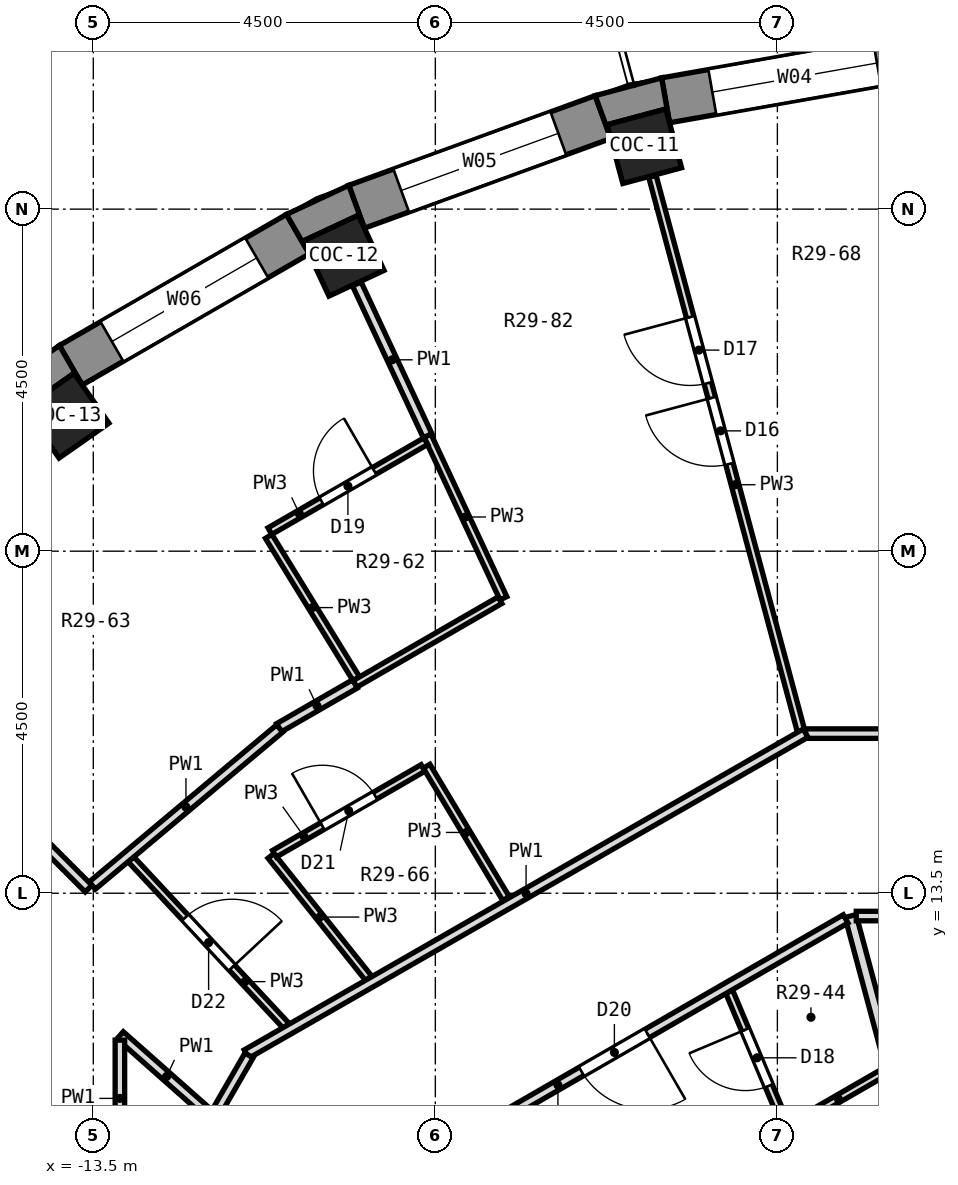
"""IFC4 building model, lengths in metres.
Left out: names, types, materials, properties, quantities, classifications, styles, units other than length and angle.
Written with IfcOpenShell. Run it as: python <this file> out.ifc"""

import sys

from ifc_helpers import new_model, si_unit, direction, frame, frame_2d, origin, origin_2d, place, context, subcontext, project, spatial, polyline, rectangle, outline, extrude, element, fill, save


model = new_model("IFC4")
c1 = context("Model", 3, precision=1e-05, world=origin(), true_north=direction((0.0, 1.0)))
c2 = subcontext(c1, "Body", "Model", "MODEL_VIEW")
j1 = project(units=[si_unit("LENGTHUNIT", "METRE"), si_unit("PLANEANGLEUNIT", "RADIAN")], contexts=[c1])
p1 = place(None, origin())
s1 = spatial("IfcSite", under=j1, at=p1, CompositionType="ELEMENT")
p2 = place(p1, origin())
s2 = spatial("IfcBuilding", under=s1, at=p2, CompositionType="ELEMENT")
p3 = place(p2, frame((0.0, 0.0, 200.4)))
s3 = spatial("IfcBuildingStorey", under=s2, at=p3, CompositionType="ELEMENT", Elevation=200.4)
for number, where, z_axis, x_axis in (
    (1, (-6.25, 23.327, 0.0), (0.0, 0.0, 1.0), (-0.259, 0.966, 0.0)),
    (2, (-10.206, 21.887, 0.0), (0.0, 0.0, 1.0), (-0.423, 0.906, 0.0)),
    (3, (-13.852, 19.782, 0.0), (0.0, 0.0, 1.0), (-0.574, 0.819, 0.0)),
):
    element("IfcColumn", number, at=place(p3, frame(where, z_axis=z_axis, x_axis=x_axis)), inside=s3, PredefinedType="COLUMN", context=c2, shape_type="SweptSolid", body=[
        extrude(rectangle(XDim=0.8, YDim=0.8, at=origin_2d()), origin(), (0.0, 0.0, 1.0), 3.3),
    ])
p4 = place(p3, frame((-2.574, 24.531, 0.0), z_axis=(0.0, 0.0, 1.0), x_axis=(-0.984814892183, -0.173607684551, 0.0)))
e4 = element("IfcWall", 4, at=p4, inside=s3, PredefinedType="SOLIDWALL", context=c2, shape_type="SweptSolid", body=[
    extrude(rectangle(XDim=3.45, YDim=0.6, at=frame_2d((1.725, 0.0))), origin(), (0.0, 0.0, 1.0), 2.85),
])
p5 = place(p4, frame((0.625, 0.0, 0.9)))
e5 = element("IfcOpeningElement", 5, at=p5, cuts=e4, PredefinedType="OPENING", context=c2, shape_type="SweptSolid", body=[
    extrude(rectangle(XDim=2.2, YDim=1.8, at=frame_2d((1.1, 0.9))), frame((0.0, 0.312, 0.0), z_axis=(0.0, -1.0, 0.0), x_axis=(1.0, 0.0, 0.0)), (0.0, 0.0, 1.0), 0.624),
])
p6 = place(p3, frame((-6.794, 23.711, 0.0), z_axis=(0.0, 0.0, 1.0), x_axis=(-0.93968799822, -0.342032843455, 0.0)))
e6 = element("IfcWall", 6, at=p6, inside=s3, PredefinedType="SOLIDWALL", context=c2, shape_type="SweptSolid", body=[
    extrude(rectangle(XDim=3.45, YDim=0.6, at=frame_2d((1.725, 0.0))), origin(), (0.0, 0.0, 1.0), 2.85),
])
p7 = place(p6, frame((0.625, 0.0, 0.9)))
e7 = element("IfcOpeningElement", 7, at=p7, cuts=e6, PredefinedType="OPENING", context=c2, shape_type="SweptSolid", body=[
    extrude(rectangle(XDim=2.2, YDim=1.8, at=frame_2d((1.1, 0.9))), frame((0.0, 0.312, 0.0), z_axis=(0.0, -1.0, 0.0), x_axis=(1.0, 0.0, 0.0)), (0.0, 0.0, 1.0), 0.624),
])
p8 = place(p3, frame((-10.809, 22.171, 0.0), z_axis=(0.0, 0.0, 1.0), x_axis=(-0.86602648383, -0.499998129301, 0.0)))
e8 = element("IfcWall", 8, at=p8, inside=s3, PredefinedType="SOLIDWALL", context=c2, shape_type="SweptSolid", body=[
    extrude(rectangle(XDim=3.45, YDim=0.6, at=frame_2d((1.725, 0.0))), origin(), (0.0, 0.0, 1.0), 2.85),
])
p9 = place(p8, frame((0.625, 0.0, 0.9)))
e9 = element("IfcOpeningElement", 9, at=p9, cuts=e8, PredefinedType="OPENING", context=c2, shape_type="SweptSolid", body=[
    extrude(rectangle(XDim=2.2, YDim=1.8, at=frame_2d((1.1, 0.9))), frame((0.0, 0.312, 0.0), z_axis=(0.0, -1.0, 0.0), x_axis=(1.0, 0.0, 0.0)), (0.0, 0.0, 1.0), 0.624),
])
p10 = place(p3, origin())
e10 = element("IfcWall", 10, at=p10, inside=s3, PredefinedType="SOLIDWALL", context=c2, shape_type="SweptSolid", body=[
    extrude(outline(polyline([(-6.023, 24.227), (-6.897, 23.993), (-6.692, 23.429), (-6.74, 23.61), (-5.968, 23.817), (-5.919, 23.636), (-6.023, 24.227)])), origin(), (0.0, 0.0, 1.0), 2.85),
])
p11 = place(p3, origin())
e11 = element("IfcWall", 11, at=p11, inside=s3, PredefinedType="SOLIDWALL", context=c2, shape_type="SweptSolid", body=[
    extrude(outline(polyline([(-10.959, 22.431), (-10.659, 21.911), (-10.738, 22.081), (-10.013, 22.419), (-9.934, 22.249), (-10.139, 22.813), (-10.959, 22.431)])), origin(), (0.0, 0.0, 1.0), 2.85),
])
p12 = place(p3, origin())
e12 = element("IfcWall", 12, at=p12, inside=s3, PredefinedType="SOLIDWALL", context=c2, shape_type="SweptSolid", body=[
    extrude(outline(polyline([(-13.946, 20.706), (-14.687, 20.187), (-14.302, 19.727), (-14.409, 19.881), (-13.754, 20.34), (-13.646, 20.186), (-13.946, 20.706)])), origin(), (0.0, 0.0, 1.0), 2.85),
])
p13 = place(p3, frame((-6.144, 22.931, 0.0), z_axis=(0.0, 0.0, 1.0), x_axis=(0.258789681819, -0.965933693679, 0.0)))
e13 = element("IfcWall", 13, at=p13, inside=s3, PredefinedType="PARTITIONING", context=c2, shape_type="SweptSolid", body=[
    extrude(rectangle(XDim=7.59, YDim=0.1, at=frame_2d((3.795, 0.0))), origin(), (0.0, 0.0, 1.0), 2.85),
])
p14 = place(p13, frame((3.016, 0.0, 0.0)))
e14 = element("IfcOpeningElement", 14, at=p14, cuts=e13, PredefinedType="OPENING", context=c2, shape_type="SweptSolid", body=[
    extrude(rectangle(XDim=0.9, YDim=2.1, at=frame_2d((0.45, 1.05))), frame((0.0, 0.062, 0.0), z_axis=(0.0, -1.0, 0.0), x_axis=(1.0, 0.0, 0.0)), (0.0, 0.0, 1.0), 0.124),
])
p15 = place(p13, frame((1.916, 0.0, 0.0)))
e15 = element("IfcOpeningElement", 15, at=p15, cuts=e13, PredefinedType="OPENING", context=c2, shape_type="SweptSolid", body=[
    extrude(rectangle(XDim=0.9, YDim=2.1, at=frame_2d((0.45, 1.05))), frame((0.0, 0.062, 0.0), z_axis=(0.0, -1.0, 0.0), x_axis=(1.0, 0.0, 0.0)), (0.0, 0.0, 1.0), 0.124),
])
p16 = place(p3, frame((-3.537, 13.2, 0.0), z_axis=(0.0, 0.0, 1.0), x_axis=(0.258907621224, -0.965902088036, 0.0)))
e16 = element("IfcWall", 16, at=p16, inside=s3, PredefinedType="PARTITIONING", context=c2, shape_type="SweptSolid", body=[
    extrude(rectangle(XDim=4.174, YDim=0.15, at=frame_2d((2.087, 0.0))), origin(), (0.0, 0.0, 1.0), 2.85),
])
p17 = place(p3, frame((-5.135, 12.206, 0.0), z_axis=(0.0, 0.0, 1.0), x_axis=(0.387906100406, -0.921698897291, 0.0)))
e17 = element("IfcWall", 17, at=p17, inside=s3, PredefinedType="PARTITIONING", context=c2, shape_type="SweptSolid", body=[
    extrude(rectangle(XDim=1.953, YDim=0.1, at=frame_2d((0.977, 0.0))), origin(), (0.0, 0.0, 1.0), 2.85),
])
p18 = place(p17, frame((0.545, 0.0, 0.0)))
e18 = element("IfcOpeningElement", 18, at=p18, cuts=e17, PredefinedType="OPENING", context=c2, shape_type="SweptSolid", body=[
    extrude(rectangle(XDim=0.8, YDim=2.1, at=frame_2d((0.4, 1.05))), frame((0.0, 0.062, 0.0), z_axis=(0.0, -1.0, 0.0), x_axis=(1.0, 0.0, 0.0)), (0.0, 0.0, 1.0), 0.124),
])
p19 = place(p3, frame((-9.103, 19.519, 0.0), z_axis=(0.0, 0.0, 1.0), x_axis=(0.422834478158, -0.906206932263, 0.0)))
e19 = element("IfcWall", 19, at=p19, inside=s3, PredefinedType="PARTITIONING", context=c2, shape_type="SweptSolid", body=[
    extrude(rectangle(XDim=2.359, YDim=0.1, at=frame_2d((1.18, 0.0))), origin(), (0.0, 0.0, 1.0), 2.85),
])
p20 = place(p3, frame((-10.033, 21.516, 0.0), z_axis=(0.0, 0.0, 1.0), x_axis=(0.422709503006, -0.906265234944, 0.0)))
e20 = element("IfcWall", 20, at=p20, inside=s3, PredefinedType="PARTITIONING", context=c2, shape_type="SweptSolid", body=[
    extrude(rectangle(XDim=2.203, YDim=0.125, at=frame_2d((1.102, 0.0))), origin(), (0.0, 0.0, 1.0), 2.85),
])
p21 = place(p3, frame((-9.115, 15.171, 0.0), z_axis=(0.0, 0.0, 1.0), x_axis=(0.514495755428, -0.857492925713, 0.0)))
e21 = element("IfcWall", 21, at=p21, inside=s3, PredefinedType="PARTITIONING", context=c2, shape_type="SweptSolid", body=[
    extrude(rectangle(XDim=2.031, YDim=0.1, at=frame_2d((1.016, 0.0))), origin(), (0.0, 0.0, 1.0), 2.85),
])
p22 = place(p3, frame((-11.193, 18.195, 0.0), z_axis=(0.0, 0.0, 1.0), x_axis=(0.524029299745, -0.851700236591, 0.0)))
e22 = element("IfcWall", 22, at=p22, inside=s3, PredefinedType="PARTITIONING", context=c2, shape_type="SweptSolid", body=[
    extrude(rectangle(XDim=2.199, YDim=0.1, at=frame_2d((1.1, 0.0))), origin(), (0.0, 0.0, 1.0), 2.85),
])
p23 = place(p3, frame((-11.162, 13.992, 0.0), z_axis=(0.0, 0.0, 1.0), x_axis=(0.62359563311, -0.781747073142, 0.0)))
e23 = element("IfcWall", 23, at=p23, inside=s3, PredefinedType="PARTITIONING", context=c2, shape_type="SweptSolid", body=[
    extrude(rectangle(XDim=2.059, YDim=0.1, at=frame_2d((1.03, 0.0))), origin(), (0.0, 0.0, 1.0), 2.85),
])
p24 = place(p3, frame((-13.004, 13.946, 0.0), z_axis=(0.0, 0.0, 1.0), x_axis=(0.681856446627, -0.731486012302, 0.0)))
e24 = element("IfcWall", 24, at=p24, inside=s3, PredefinedType="PARTITIONING", context=c2, shape_type="SweptSolid", body=[
    extrude(rectangle(XDim=2.996, YDim=0.1, at=frame_2d((1.498, 0.0))), origin(), (0.0, 0.0, 1.0), 2.85),
])
p25 = place(p24, frame((1.048, 0.0, 0.0)))
e25 = element("IfcOpeningElement", 25, at=p25, cuts=e24, PredefinedType="OPENING", context=c2, shape_type="SweptSolid", body=[
    extrude(rectangle(XDim=0.9, YDim=2.1, at=frame_2d((0.45, 1.05))), frame((0.0, 0.062, 0.0), z_axis=(0.0, -1.0, 0.0), x_axis=(1.0, 0.0, 0.0)), (0.0, 0.0, 1.0), 0.124),
])
p26 = place(p3, frame((-16.787, 16.787, 0.0), z_axis=(0.0, 0.0, 1.0), x_axis=(0.707026475293, -0.707187077961, 0.0)))
e26 = element("IfcWall", 26, at=p26, inside=s3, PredefinedType="PARTITIONING", context=c2, shape_type="SweptSolid", body=[
    extrude(rectangle(XDim=4.561, YDim=0.125, at=frame_2d((2.28, 0.0))), origin(), (0.0, 0.0, 1.0), 2.85),
])
p27 = place(p26, frame((1.502, 0.0, 0.0)))
e27 = element("IfcOpeningElement", 27, at=p27, cuts=e26, PredefinedType="OPENING", context=c2, shape_type="SweptSolid", body=[
    extrude(rectangle(XDim=0.9, YDim=2.1, at=frame_2d((0.45, 1.05))), frame((0.0, 0.074, 0.0), z_axis=(0.0, -1.0, 0.0), x_axis=(1.0, 0.0, 0.0)), (0.0, 0.0, 1.0), 0.149),
])
p28 = place(p3, frame((-13.147, 11.631, 0.0), z_axis=(0.0, 0.0, 1.0), x_axis=(0.748973743587, -0.66259967659, 0.0)))
e28 = element("IfcWall", 28, at=p28, inside=s3, PredefinedType="PARTITIONING", context=c2, shape_type="SweptSolid", body=[
    extrude(rectangle(XDim=1.634, YDim=0.125, at=frame_2d((0.817, 0.0))), origin(), (0.0, 0.0, 1.0), 2.85),
])
p29 = place(p3, frame((-3.462, 13.2, 0.0), z_axis=(0.0, 0.0, 1.0), x_axis=(1.0, 0.0, 0.0)))
e29 = element("IfcWall", 29, at=p29, inside=s3, PredefinedType="PARTITIONING", context=c2, shape_type="SweptSolid", body=[
    extrude(rectangle(XDim=6.937, YDim=0.125, at=frame_2d((3.468, 0.0))), origin(), (0.0, 0.0, 1.0), 2.85),
])
p30 = place(p29, frame((5.614, 0.0, 0.0)))
e30 = element("IfcOpeningElement", 30, at=p30, cuts=e29, PredefinedType="OPENING", context=c2, shape_type="SweptSolid", body=[
    extrude(rectangle(XDim=1.0, YDim=2.1, at=frame_2d((0.5, 1.05))), frame((0.0, 0.074, 0.0), z_axis=(0.0, -1.0, 0.0), x_axis=(1.0, 0.0, 0.0)), (0.0, 0.0, 1.0), 0.149),
])
p31 = place(p29, frame((3.013, 0.0, 0.0)))
e31 = element("IfcOpeningElement", 31, at=p31, cuts=e29, PredefinedType="OPENING", context=c2, shape_type="SweptSolid", body=[
    extrude(rectangle(XDim=1.0, YDim=2.1, at=frame_2d((0.5, 1.05))), frame((0.0, 0.074, 0.0), z_axis=(0.0, -1.0, 0.0), x_axis=(1.0, 0.0, 0.0)), (0.0, 0.0, 1.0), 0.149),
])
p32 = place(p3, frame((-4.129, 15.6, 0.0), z_axis=(0.0, 0.0, 1.0), x_axis=(1.0, 0.0, 0.0)))
e32 = element("IfcWall", 32, at=p32, inside=s3, PredefinedType="PARTITIONING", context=c2, shape_type="SweptSolid", body=[
    extrude(rectangle(XDim=8.246, YDim=0.125, at=frame_2d((4.123, 0.0))), origin(), (0.0, 0.0, 1.0), 2.85),
])
p33 = place(p32, frame((6.26, 0.0, 0.0)))
e33 = element("IfcOpeningElement", 33, at=p33, cuts=e32, PredefinedType="OPENING", context=c2, shape_type="SweptSolid", body=[
    extrude(rectangle(XDim=1.0, YDim=2.1, at=frame_2d((0.5, 1.05))), frame((0.0, 0.074, 0.0), z_axis=(0.0, -1.0, 0.0), x_axis=(1.0, 0.0, 0.0)), (0.0, 0.0, 1.0), 0.149),
])
p34 = place(p32, frame((2.221, 0.0, 0.0)))
e34 = element("IfcOpeningElement", 34, at=p34, cuts=e32, PredefinedType="OPENING", context=c2, shape_type="SweptSolid", body=[
    extrude(rectangle(XDim=1.0, YDim=2.1, at=frame_2d((0.5, 1.05))), frame((0.0, 0.074, 0.0), z_axis=(0.0, -1.0, 0.0), x_axis=(1.0, 0.0, 0.0)), (0.0, 0.0, 1.0), 0.149),
])
p35 = place(p3, frame((-11.484, 11.385, 0.0), z_axis=(0.0, 0.0, 1.0), x_axis=(0.867290156456, 0.497802957519, 0.0)))
e35 = element("IfcWall", 35, at=p35, inside=s3, PredefinedType="PARTITIONING", context=c2, shape_type="SweptSolid", body=[
    extrude(rectangle(XDim=8.48, YDim=0.125, at=frame_2d((4.24, 0.0))), origin(), (0.0, 0.0, 1.0), 2.85),
])
p36 = place(p3, frame((-4.334, 10.431, 0.0), z_axis=(0.0, 0.0, 1.0), x_axis=(0.866110606688, 0.499852395195, 0.0)))
e36 = element("IfcWall", 36, at=p36, inside=s3, PredefinedType="PARTITIONING", context=c2, shape_type="SweptSolid", body=[
    extrude(rectangle(XDim=1.464, YDim=0.1, at=frame_2d((0.732, 0.0))), origin(), (0.0, 0.0, 1.0), 2.85),
])
p37 = place(p3, frame((-9.726, 9.627, 0.0), z_axis=(0.0, 0.0, 1.0), x_axis=(0.866011939619, 0.500023319893, 0.0)))
e37 = element("IfcWall", 37, at=p37, inside=s3, PredefinedType="PARTITIONING", context=c2, shape_type="SweptSolid", body=[
    extrude(rectangle(XDim=7.071, YDim=0.125, at=frame_2d((3.536, 0.0))), origin(), (0.0, 0.0, 1.0), 2.85),
])
p38 = place(p37, frame((3.058, 0.0, 0.0)))
e38 = element("IfcOpeningElement", 38, at=p38, cuts=e37, PredefinedType="OPENING", context=c2, shape_type="SweptSolid", body=[
    extrude(rectangle(XDim=1.0, YDim=2.1, at=frame_2d((0.5, 1.05))), frame((0.0, 0.074, 0.0), z_axis=(0.0, -1.0, 0.0), x_axis=(1.0, 0.0, 0.0)), (0.0, 0.0, 1.0), 0.149),
])
p39 = place(p3, frame((-11.117, 14.02, 0.0), z_axis=(0.0, 0.0, 1.0), x_axis=(0.866084712978, 0.49989725939, 0.0)))
e39 = element("IfcWall", 39, at=p39, inside=s3, PredefinedType="PARTITIONING", context=c2, shape_type="SweptSolid", body=[
    extrude(rectangle(XDim=2.257, YDim=0.1, at=frame_2d((1.128, 0.0))), origin(), (0.0, 0.0, 1.0), 2.85),
])
p40 = place(p39, frame((0.729, 0.0, 0.0)))
e40 = element("IfcOpeningElement", 40, at=p40, cuts=e39, PredefinedType="OPENING", context=c2, shape_type="SweptSolid", body=[
    extrude(rectangle(XDim=0.8, YDim=2.1, at=frame_2d((0.4, 1.05))), frame((0.0, 0.062, 0.0), z_axis=(0.0, -1.0, 0.0), x_axis=(1.0, 0.0, 0.0)), (0.0, 0.0, 1.0), 0.124),
])
p41 = place(p3, frame((-10.058, 16.253, 0.0), z_axis=(0.0, 0.0, 1.0), x_axis=(0.866039875853, 0.499974932805, 0.0)))
e41 = element("IfcWall", 41, at=p41, inside=s3, PredefinedType="PARTITIONING", context=c2, shape_type="SweptSolid", body=[
    extrude(rectangle(XDim=2.204, YDim=0.1, at=frame_2d((1.102, 0.0))), origin(), (0.0, 0.0, 1.0), 2.85),
])
p42 = place(p3, frame((-11.057, 15.677, 0.0), z_axis=(0.0, 0.0, 1.0), x_axis=(0.866308888763, 0.499508667843, 0.0)))
e42 = element("IfcWall", 42, at=p42, inside=s3, PredefinedType="PARTITIONING", context=c2, shape_type="SweptSolid", body=[
    extrude(rectangle(XDim=1.154, YDim=0.125, at=frame_2d((0.577, 0.0))), origin(), (0.0, 0.0, 1.0), 2.85),
])
p43 = place(p3, frame((-11.177, 18.264, 0.0), z_axis=(0.0, 0.0, 1.0), x_axis=(0.866180437728, 0.49973137714, 0.0)))
e43 = element("IfcWall", 43, at=p43, inside=s3, PredefinedType="PARTITIONING", context=c2, shape_type="SweptSolid", body=[
    extrude(rectangle(XDim=2.368, YDim=0.1, at=frame_2d((1.184, 0.0))), origin(), (0.0, 0.0, 1.0), 2.85),
])
p44 = place(p43, frame((0.785, 0.0, 0.0)))
e44 = element("IfcOpeningElement", 44, at=p44, cuts=e43, PredefinedType="OPENING", context=c2, shape_type="SweptSolid", body=[
    extrude(rectangle(XDim=0.8, YDim=2.1, at=frame_2d((0.4, 1.05))), frame((0.0, 0.062, 0.0), z_axis=(0.0, -1.0, 0.0), x_axis=(1.0, 0.0, 0.0)), (0.0, 0.0, 1.0), 0.124),
])
p45 = place(p3, frame((-13.513, 13.601, 0.0), z_axis=(0.0, 0.0, 1.0), x_axis=(0.766376010837, 0.642392255567, 0.0)))
e45 = element("IfcWall", 45, at=p45, inside=s3, PredefinedType="PARTITIONING", context=c2, shape_type="SweptSolid", body=[
    extrude(rectangle(XDim=3.216, YDim=0.125, at=frame_2d((1.608, 0.0))), origin(), (0.0, 0.0, 1.0), 2.85),
])
p46 = place(p3, frame((-11.891, 10.604, 0.0), z_axis=(0.0, 0.0, 1.0), x_axis=(0.500018690203, 0.866014612722, 0.0)))
e46 = element("IfcWall", 46, at=p46, inside=s3, PredefinedType="PARTITIONING", context=c2, shape_type="SweptSolid", body=[
    extrude(rectangle(XDim=0.88, YDim=0.125, at=frame_2d((0.44, 0.0))), origin(), (0.0, 0.0, 1.0), 2.85),
])
p47 = place(p3, frame((-13.15, 9.351, 0.0), z_axis=(0.0, 0.0, 1.0), x_axis=(0.0, 1.0, 0.0)))
e47 = element("IfcWall", 47, at=p47, inside=s3, PredefinedType="PARTITIONING", context=c2, shape_type="SweptSolid", body=[
    extrude(rectangle(XDim=2.216, YDim=0.125, at=frame_2d((1.108, 0.0))), origin(), (0.0, 0.0, 1.0), 2.85),
])
p48 = place(p47, frame((0.189, 0.0, 0.0)))
e48 = element("IfcOpeningElement", 48, at=p48, cuts=e47, PredefinedType="OPENING", context=c2, shape_type="SweptSolid", body=[
    extrude(rectangle(XDim=0.9, YDim=2.1, at=frame_2d((0.45, 1.05))), frame((0.0, 0.074, 0.0), z_axis=(0.0, -1.0, 0.0), x_axis=(1.0, 0.0, 0.0)), (0.0, 0.0, 1.0), 0.149),
])
p49 = place(p5, origin())
e49 = element("IfcWindow", 49, at=p49, inside=s3, PartitioningType="SINGLE_PANEL", PredefinedType="WINDOW", context=c2, shape_type="SweptSolid", body=[
    extrude(rectangle(XDim=2.2, YDim=1.8, at=frame_2d((1.1, 0.9))), frame((0.0, 0.18, 0.0), z_axis=(0.0, -1.0, 0.0), x_axis=(1.0, 0.0, 0.0)), (0.0, 0.0, 1.0), 0.06),
])
fill(e5, e49)
p50 = place(p7, origin())
e50 = element("IfcWindow", 50, at=p50, inside=s3, PartitioningType="SINGLE_PANEL", PredefinedType="WINDOW", context=c2, shape_type="SweptSolid", body=[
    extrude(rectangle(XDim=2.2, YDim=1.8, at=frame_2d((1.1, 0.9))), frame((0.0, 0.18, 0.0), z_axis=(0.0, -1.0, 0.0), x_axis=(1.0, 0.0, 0.0)), (0.0, 0.0, 1.0), 0.06),
])
fill(e7, e50)
p51 = place(p9, origin())
e51 = element("IfcWindow", 51, at=p51, inside=s3, PartitioningType="SINGLE_PANEL", PredefinedType="WINDOW", context=c2, shape_type="SweptSolid", body=[
    extrude(rectangle(XDim=2.2, YDim=1.8, at=frame_2d((1.1, 0.9))), frame((0.0, 0.18, 0.0), z_axis=(0.0, -1.0, 0.0), x_axis=(1.0, 0.0, 0.0)), (0.0, 0.0, 1.0), 0.06),
])
fill(e9, e51)
p52 = place(p14, frame((0.9, 0.0, 0.0), z_axis=(0.0, 0.0, 1.0), x_axis=(-1.0, 0.0, 0.0)))
e52 = element("IfcDoor", 52, at=p52, inside=s3, OperationType="SINGLE_SWING_RIGHT", PredefinedType="DOOR", context=c2, shape_type="SweptSolid", body=[
    extrude(rectangle(XDim=0.9, YDim=2.1, at=frame_2d((0.45, 1.05))), frame((0.0, 0.025, 0.0), z_axis=(0.0, -1.0, 0.0), x_axis=(1.0, 0.0, 0.0)), (0.0, 0.0, 1.0), 0.05),
])
fill(e14, e52)
p53 = place(p15, frame((0.9, 0.0, 0.0), z_axis=(0.0, 0.0, 1.0), x_axis=(-1.0, 0.0, 0.0)))
e53 = element("IfcDoor", 53, at=p53, inside=s3, OperationType="SINGLE_SWING_RIGHT", PredefinedType="DOOR", context=c2, shape_type="SweptSolid", body=[
    extrude(rectangle(XDim=0.9, YDim=2.1, at=frame_2d((0.45, 1.05))), frame((0.0, 0.025, 0.0), z_axis=(0.0, -1.0, 0.0), x_axis=(1.0, 0.0, 0.0)), (0.0, 0.0, 1.0), 0.05),
])
fill(e15, e53)
p54 = place(p18, frame((0.8, 0.0, 0.0), z_axis=(0.0, 0.0, 1.0), x_axis=(-1.0, 0.0, 0.0)))
e54 = element("IfcDoor", 54, at=p54, inside=s3, OperationType="SINGLE_SWING_RIGHT", PredefinedType="DOOR", context=c2, shape_type="SweptSolid", body=[
    extrude(rectangle(XDim=0.8, YDim=2.1, at=frame_2d((0.4, 1.05))), frame((0.0, 0.025, 0.0), z_axis=(0.0, -1.0, 0.0), x_axis=(1.0, 0.0, 0.0)), (0.0, 0.0, 1.0), 0.05),
])
fill(e18, e54)
p55 = place(p44, origin())
e55 = element("IfcDoor", 55, at=p55, inside=s3, OperationType="SINGLE_SWING_RIGHT", PredefinedType="DOOR", context=c2, shape_type="SweptSolid", body=[
    extrude(rectangle(XDim=0.8, YDim=2.1, at=frame_2d((0.4, 1.05))), frame((0.0, 0.025, 0.0), z_axis=(0.0, -1.0, 0.0), x_axis=(1.0, 0.0, 0.0)), (0.0, 0.0, 1.0), 0.05),
])
fill(e44, e55)
p56 = place(p38, frame((1.0, 0.0, 0.0), z_axis=(0.0, 0.0, 1.0), x_axis=(-1.0, 0.0, 0.0)))
e56 = element("IfcDoor", 56, at=p56, inside=s3, OperationType="SINGLE_SWING_LEFT", PredefinedType="DOOR", context=c2, shape_type="SweptSolid", body=[
    extrude(rectangle(XDim=1.0, YDim=2.1, at=frame_2d((0.5, 1.05))), frame((0.0, 0.025, 0.0), z_axis=(0.0, -1.0, 0.0), x_axis=(1.0, 0.0, 0.0)), (0.0, 0.0, 1.0), 0.05),
])
fill(e38, e56)
p57 = place(p40, origin())
e57 = element("IfcDoor", 57, at=p57, inside=s3, OperationType="SINGLE_SWING_LEFT", PredefinedType="DOOR", context=c2, shape_type="SweptSolid", body=[
    extrude(rectangle(XDim=0.8, YDim=2.1, at=frame_2d((0.4, 1.05))), frame((0.0, 0.025, 0.0), z_axis=(0.0, -1.0, 0.0), x_axis=(1.0, 0.0, 0.0)), (0.0, 0.0, 1.0), 0.05),
])
fill(e40, e57)
p58 = place(p25, origin())
e58 = element("IfcDoor", 58, at=p58, inside=s3, OperationType="SINGLE_SWING_RIGHT", PredefinedType="DOOR", context=c2, shape_type="SweptSolid", body=[
    extrude(rectangle(XDim=0.9, YDim=2.1, at=frame_2d((0.45, 1.05))), frame((0.0, 0.025, 0.0), z_axis=(0.0, -1.0, 0.0), x_axis=(1.0, 0.0, 0.0)), (0.0, 0.0, 1.0), 0.05),
])
fill(e25, e58)
save(model, sys.argv[1])
